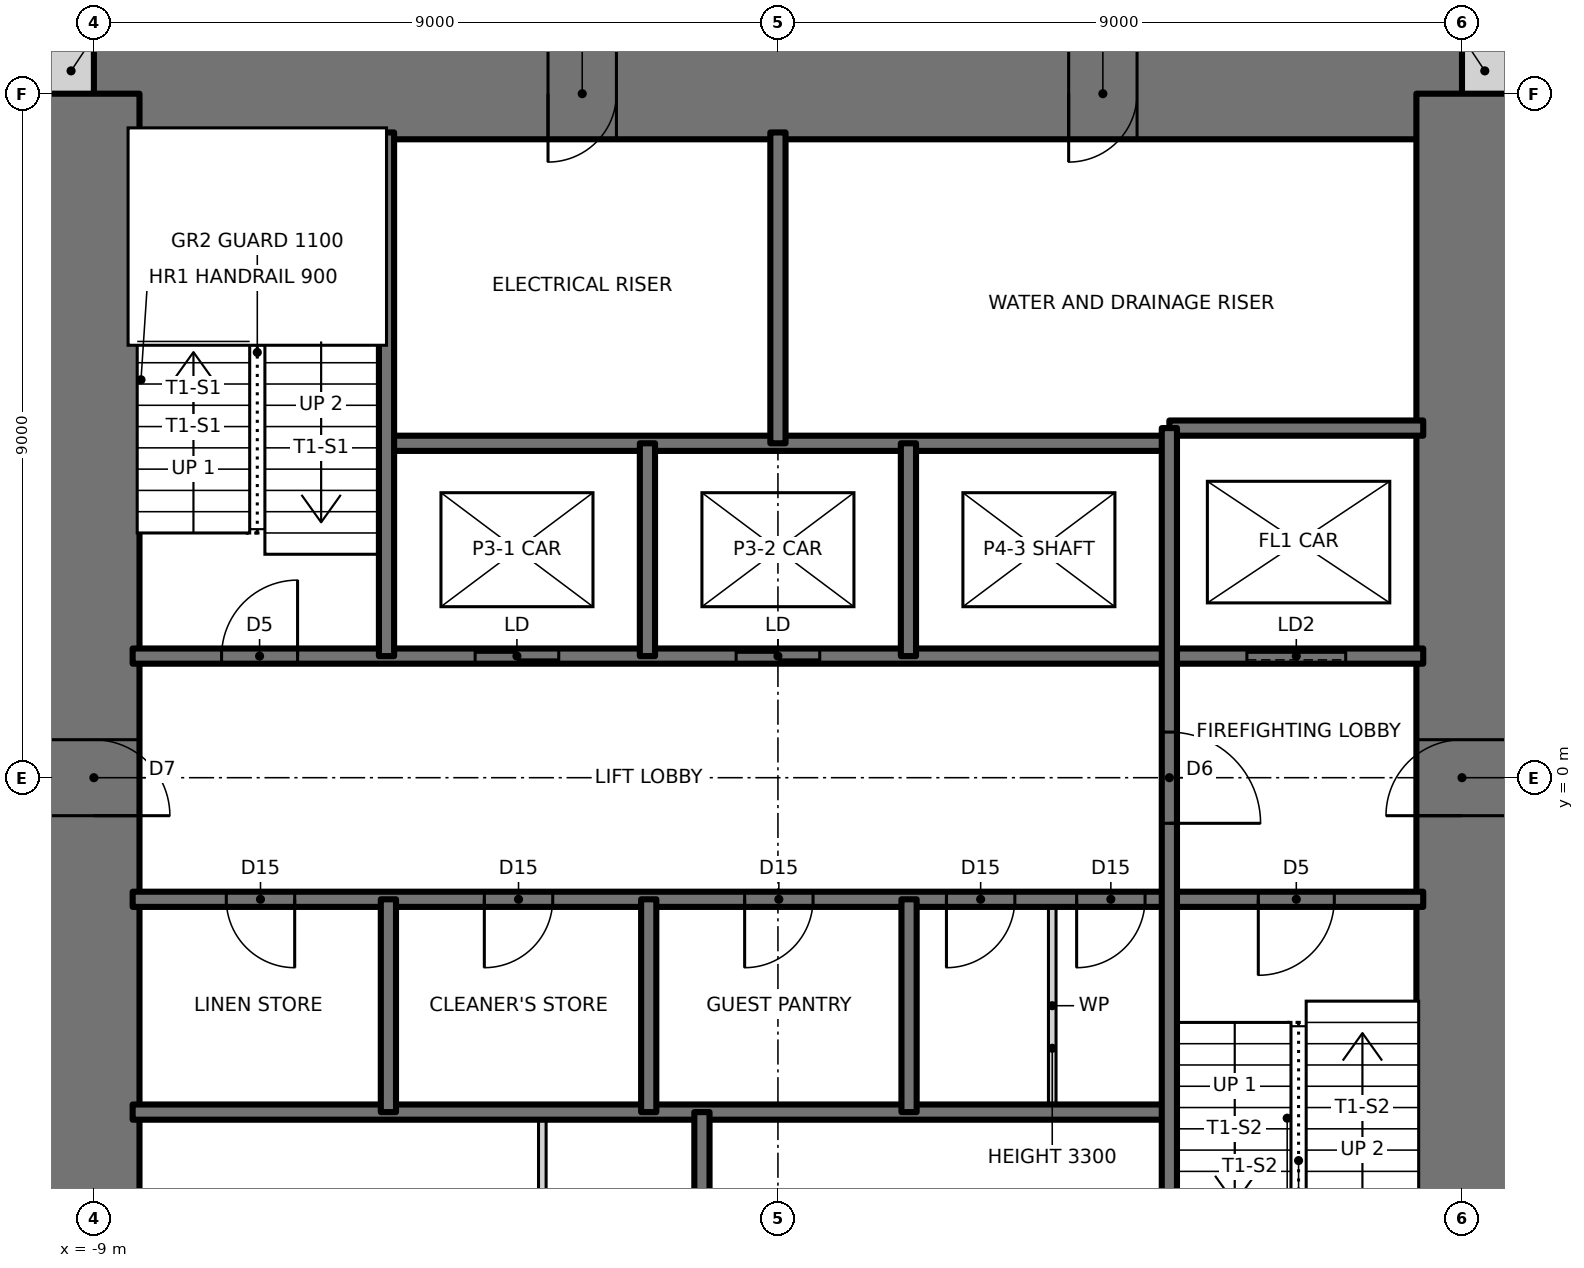
"""IFC4 building model, lengths in metres.
Left out: names, types, materials, properties, quantities, classifications, styles, units other than length and angle.
Written with IfcOpenShell. Run it as: python <this file> out.ifc"""

import sys

from ifc_helpers import new_model, si_unit, direction, frame, frame_2d, origin, place, context, subcontext, project, spatial, rectangle, extrude, element, fill, save


model = new_model("IFC4")
c1 = context("Model", 3, precision=1e-05, world=origin(), true_north=direction((0.0, 1.0)))
c2 = subcontext(c1, "Body", "Model", "MODEL_VIEW")
j1 = project(units=[si_unit("LENGTHUNIT", "METRE"), si_unit("PLANEANGLEUNIT", "RADIAN")], contexts=[c1])
p1 = place(None, origin())
s1 = spatial("IfcSite", under=j1, at=p1, CompositionType="ELEMENT")
p2 = place(p1, origin())
s2 = spatial("IfcBuilding", under=s1, at=p2, CompositionType="ELEMENT")
p3 = place(p2, frame((0.0, 0.0, 184.5)))
s3 = spatial("IfcBuildingStorey", under=s2, at=p3, CompositionType="ELEMENT", Elevation=184.5)
for number, where, z_axis, x_axis in (
    (1, (9.0, 9.3, 0.0), (0.0, 0.0, 1.0), (1.0, 0.0, 0.0)),
    (2, (-9.6, 9.3, 0.0), (0.0, 0.0, 1.0), (1.0, 0.0, 0.0)),
):
    element("IfcWall", number, at=place(p3, frame(where, z_axis=z_axis, x_axis=x_axis)), inside=s3, PredefinedType="SOLIDWALL", context=c2, shape_type="SweptSolid", body=[
        extrude(rectangle(XDim=0.6, YDim=0.6, at=frame_2d((0.3, 0.0))), origin(), (0.0, 0.0, 1.0), 3.5),
    ])
p4 = place(p3, frame((9.0, 9.0, 0.0), z_axis=(0.0, 0.0, 1.0), x_axis=(-1.0, 0.0, 0.0)))
e3 = element("IfcWall", 3, at=p4, inside=s3, PredefinedType="SHEAR", context=c2, shape_type="SweptSolid", body=[
    extrude(rectangle(XDim=18.0, YDim=1.2, at=frame_2d((9.0, 0.0))), origin(), (0.0, 0.0, 1.0), 3.5),
])
p5 = place(p4, frame((11.125, 0.0, 0.0)))
e4 = element("IfcOpeningElement", 4, at=p5, cuts=e3, PredefinedType="OPENING", context=c2, shape_type="SweptSolid", body=[
    extrude(rectangle(XDim=0.9, YDim=2.1, at=frame_2d((0.45, 1.05))), frame((0.0, 0.61, 0.0), z_axis=(0.0, -1.0, 0.0), x_axis=(1.0, 0.0, 0.0)), (0.0, 0.0, 1.0), 1.22),
])
p6 = place(p4, frame((4.275, 0.0, 0.0)))
e5 = element("IfcOpeningElement", 5, at=p6, cuts=e3, PredefinedType="OPENING", context=c2, shape_type="SweptSolid", body=[
    extrude(rectangle(XDim=0.9, YDim=2.1, at=frame_2d((0.45, 1.05))), frame((0.0, 0.61, 0.0), z_axis=(0.0, -1.0, 0.0), x_axis=(1.0, 0.0, 0.0)), (0.0, 0.0, 1.0), 1.22),
])
p7 = place(p3, frame((9.0, -9.0, 0.0), z_axis=(0.0, 0.0, 1.0), x_axis=(0.0, 1.0, 0.0)))
e6 = element("IfcWall", 6, at=p7, inside=s3, PredefinedType="SHEAR", context=c2, shape_type="SweptSolid", body=[
    extrude(rectangle(XDim=18.0, YDim=1.2, at=frame_2d((9.0, 0.0))), origin(), (0.0, 0.0, 1.0), 3.5),
])
p8 = place(p7, frame((8.5, 0.0, 0.0)))
e7 = element("IfcOpeningElement", 7, at=p8, cuts=e6, PredefinedType="OPENING", context=c2, shape_type="SweptSolid", body=[
    extrude(rectangle(XDim=1.0, YDim=2.1, at=frame_2d((0.5, 1.05))), frame((0.0, 0.61, 0.0), z_axis=(0.0, -1.0, 0.0), x_axis=(1.0, 0.0, 0.0)), (0.0, 0.0, 1.0), 1.22),
])
p9 = place(p3, frame((-9.0, 9.0, 0.0), z_axis=(0.0, 0.0, 1.0), x_axis=(0.0, -1.0, 0.0)))
e8 = element("IfcWall", 8, at=p9, inside=s3, PredefinedType="SHEAR", context=c2, shape_type="SweptSolid", body=[
    extrude(rectangle(XDim=18.0, YDim=1.2, at=frame_2d((9.0, 0.0))), origin(), (0.0, 0.0, 1.0), 3.5),
])
p10 = place(p9, frame((8.5, 0.0, 0.0)))
e9 = element("IfcOpeningElement", 9, at=p10, cuts=e8, PredefinedType="OPENING", context=c2, shape_type="SweptSolid", body=[
    extrude(rectangle(XDim=1.0, YDim=2.1, at=frame_2d((0.5, 1.05))), frame((0.0, 0.61, 0.0), z_axis=(0.0, -1.0, 0.0), x_axis=(1.0, 0.0, 0.0)), (0.0, 0.0, 1.0), 1.22),
])
p11 = place(p3, frame((-8.49, -4.4, 0.0), z_axis=(0.0, 0.0, 1.0), x_axis=(1.0, 0.0, 0.0)))
e10 = element("IfcWall", 10, at=p11, inside=s3, PredefinedType="SOLIDWALL", context=c2, shape_type="SweptSolid", body=[
    extrude(rectangle(XDim=13.64, YDim=0.2, at=frame_2d((6.82, 0.0))), origin(), (0.0, 0.0, 1.0), 3.5),
])
p12 = place(p3, frame((-8.49, -1.6, 0.0), z_axis=(0.0, 0.0, 1.0), x_axis=(1.0, 0.0, 0.0)))
e11 = element("IfcWall", 11, at=p12, inside=s3, PredefinedType="SOLIDWALL", context=c2, shape_type="SweptSolid", body=[
    extrude(rectangle(XDim=16.98, YDim=0.2, at=frame_2d((8.49, 0.0))), origin(), (0.0, 0.0, 1.0), 3.5),
])
p13 = place(p12, frame((14.81, 0.0, 0.0)))
e12 = element("IfcOpeningElement", 12, at=p13, cuts=e11, PredefinedType="OPENING", context=c2, shape_type="SweptSolid", body=[
    extrude(rectangle(XDim=1.0, YDim=2.1, at=frame_2d((0.5, 1.05))), frame((0.0, 0.11, 0.0), z_axis=(0.0, -1.0, 0.0), x_axis=(1.0, 0.0, 0.0)), (0.0, 0.0, 1.0), 0.22),
])
p14 = place(p12, frame((1.232, 0.0, 0.0)))
e13 = element("IfcOpeningElement", 13, at=p14, cuts=e11, PredefinedType="OPENING", context=c2, shape_type="SweptSolid", body=[
    extrude(rectangle(XDim=0.9, YDim=2.1, at=frame_2d((0.45, 1.05))), frame((0.0, 0.11, 0.0), z_axis=(0.0, -1.0, 0.0), x_axis=(1.0, 0.0, 0.0)), (0.0, 0.0, 1.0), 0.22),
])
p15 = place(p12, frame((4.627, 0.0, 0.0)))
e14 = element("IfcOpeningElement", 14, at=p15, cuts=e11, PredefinedType="OPENING", context=c2, shape_type="SweptSolid", body=[
    extrude(rectangle(XDim=0.9, YDim=2.1, at=frame_2d((0.45, 1.05))), frame((0.0, 0.11, 0.0), z_axis=(0.0, -1.0, 0.0), x_axis=(1.0, 0.0, 0.0)), (0.0, 0.0, 1.0), 0.22),
])
p16 = place(p12, frame((8.052, 0.0, 0.0)))
e15 = element("IfcOpeningElement", 15, at=p16, cuts=e11, PredefinedType="OPENING", context=c2, shape_type="SweptSolid", body=[
    extrude(rectangle(XDim=0.9, YDim=2.1, at=frame_2d((0.45, 1.05))), frame((0.0, 0.11, 0.0), z_axis=(0.0, -1.0, 0.0), x_axis=(1.0, 0.0, 0.0)), (0.0, 0.0, 1.0), 0.22),
])
p17 = place(p12, frame((12.42, 0.0, 0.0)))
e16 = element("IfcOpeningElement", 16, at=p17, cuts=e11, PredefinedType="OPENING", context=c2, shape_type="SweptSolid", body=[
    extrude(rectangle(XDim=0.9, YDim=2.1, at=frame_2d((0.45, 1.05))), frame((0.0, 0.11, 0.0), z_axis=(0.0, -1.0, 0.0), x_axis=(1.0, 0.0, 0.0)), (0.0, 0.0, 1.0), 0.22),
])
p18 = place(p12, frame((10.707, 0.0, 0.0)))
e17 = element("IfcOpeningElement", 17, at=p18, cuts=e11, PredefinedType="OPENING", context=c2, shape_type="SweptSolid", body=[
    extrude(rectangle(XDim=0.9, YDim=2.1, at=frame_2d((0.45, 1.05))), frame((0.0, 0.11, 0.0), z_axis=(0.0, -1.0, 0.0), x_axis=(1.0, 0.0, 0.0)), (0.0, 0.0, 1.0), 0.22),
])
p19 = place(p3, frame((-8.49, 1.6, 0.0), z_axis=(0.0, 0.0, 1.0), x_axis=(1.0, 0.0, 0.0)))
e18 = element("IfcWall", 18, at=p19, inside=s3, PredefinedType="SOLIDWALL", context=c2, shape_type="SweptSolid", body=[
    extrude(rectangle(XDim=16.98, YDim=0.2, at=frame_2d((8.49, 0.0))), origin(), (0.0, 0.0, 1.0), 3.5),
])
p20 = place(p19, frame((1.17, 0.0, 0.0)))
e19 = element("IfcOpeningElement", 19, at=p20, cuts=e18, PredefinedType="OPENING", context=c2, shape_type="SweptSolid", body=[
    extrude(rectangle(XDim=1.0, YDim=2.1, at=frame_2d((0.5, 1.05))), frame((0.0, 0.11, 0.0), z_axis=(0.0, -1.0, 0.0), x_axis=(1.0, 0.0, 0.0)), (0.0, 0.0, 1.0), 0.22),
])
p21 = place(p19, frame((4.506, 0.0, 0.0)))
e20 = element("IfcOpeningElement", 20, at=p21, cuts=e18, PredefinedType="OPENING", context=c2, shape_type="SweptSolid", body=[
    extrude(rectangle(XDim=1.1, YDim=2.1, at=frame_2d((0.55, 1.05))), frame((0.0, 0.11, 0.0), z_axis=(0.0, -1.0, 0.0), x_axis=(1.0, 0.0, 0.0)), (0.0, 0.0, 1.0), 0.22),
])
p22 = place(p19, frame((7.94, 0.0, 0.0)))
e21 = element("IfcOpeningElement", 21, at=p22, cuts=e18, PredefinedType="OPENING", context=c2, shape_type="SweptSolid", body=[
    extrude(rectangle(XDim=1.1, YDim=2.1, at=frame_2d((0.55, 1.05))), frame((0.0, 0.11, 0.0), z_axis=(0.0, -1.0, 0.0), x_axis=(1.0, 0.0, 0.0)), (0.0, 0.0, 1.0), 0.22),
])
p23 = place(p19, frame((14.66, 0.0, 0.0)))
e22 = element("IfcOpeningElement", 22, at=p23, cuts=e18, PredefinedType="OPENING", context=c2, shape_type="SweptSolid", body=[
    extrude(rectangle(XDim=1.3, YDim=2.1, at=frame_2d((0.65, 1.05))), frame((0.0, 0.11, 0.0), z_axis=(0.0, -1.0, 0.0), x_axis=(1.0, 0.0, 0.0)), (0.0, 0.0, 1.0), 0.22),
])
p24 = place(p3, frame((-5.15, 4.4, 0.0), z_axis=(0.0, 0.0, 1.0), x_axis=(1.0, 0.0, 0.0)))
e23 = element("IfcWall", 23, at=p24, inside=s3, PredefinedType="SOLIDWALL", context=c2, shape_type="SweptSolid", body=[
    extrude(rectangle(XDim=10.3, YDim=0.2, at=frame_2d((5.15, 0.0))), origin(), (0.0, 0.0, 1.0), 3.5),
])
p25 = place(p3, frame((5.15, 4.6, 0.0), z_axis=(0.0, 0.0, 1.0), x_axis=(1.0, 0.0, 0.0)))
e24 = element("IfcWall", 24, at=p25, inside=s3, PredefinedType="SOLIDWALL", context=c2, shape_type="SweptSolid", body=[
    extrude(rectangle(XDim=3.34, YDim=0.2, at=frame_2d((1.67, 0.0))), origin(), (0.0, 0.0, 1.0), 3.5),
])
p26 = place(p3, frame((5.15, -8.49, 0.0), z_axis=(0.0, 0.0, 1.0), x_axis=(0.0, 1.0, 0.0)))
e25 = element("IfcWall", 25, at=p26, inside=s3, PredefinedType="SOLIDWALL", context=c2, shape_type="SweptSolid", body=[
    extrude(rectangle(XDim=13.09, YDim=0.2, at=frame_2d((6.545, 0.0))), origin(), (0.0, 0.0, 1.0), 3.5),
])
p27 = place(p26, frame((7.89, 0.0, 0.0)))
e26 = element("IfcOpeningElement", 26, at=p27, cuts=e25, PredefinedType="OPENING", context=c2, shape_type="SweptSolid", body=[
    extrude(rectangle(XDim=1.2, YDim=2.1, at=frame_2d((0.6, 1.05))), frame((0.0, 0.11, 0.0), z_axis=(0.0, -1.0, 0.0), x_axis=(1.0, 0.0, 0.0)), (0.0, 0.0, 1.0), 0.22),
])
p28 = place(p3, frame((3.609, -4.4, 0.0), z_axis=(0.0, 0.0, 1.0), x_axis=(0.0, 1.0, 0.0)))
e27 = element("IfcWall", 27, at=p28, inside=s3, PredefinedType="PARTITIONING", context=c2, shape_type="SweptSolid", body=[
    extrude(rectangle(XDim=2.8, YDim=0.1, at=frame_2d((1.4, 0.0))), origin(), (0.0, 0.0, 1.0), 3.3),
])
for number, where, z_axis, x_axis in (
    (28, (1.725, -4.4, 0.0), (0.0, 0.0, 1.0), (0.0, 1.0, 0.0)),
    (29, (1.717, 1.6, 0.0), (0.0, 0.0, 1.0), (0.0, 1.0, 0.0)),
):
    element("IfcWall", number, at=place(p3, frame(where, z_axis=z_axis, x_axis=x_axis)), inside=s3, PredefinedType="SOLIDWALL", context=c2, shape_type="SweptSolid", body=[
        extrude(rectangle(XDim=2.8, YDim=0.2, at=frame_2d((1.4, 0.0))), origin(), (0.0, 0.0, 1.0), 3.5),
    ])
for number, where, z_axis, x_axis in (
    (30, (0.0, 4.4, 0.0), (0.0, 0.0, 1.0), (0.0, 1.0, 0.0)),
    (31, (-1.0, -8.49, 0.0), (0.0, 0.0, 1.0), (0.0, 1.0, 0.0)),
):
    element("IfcWall", number, at=place(p3, frame(where, z_axis=z_axis, x_axis=x_axis)), inside=s3, PredefinedType="SOLIDWALL", context=c2, shape_type="SweptSolid", body=[
        extrude(rectangle(XDim=4.09, YDim=0.2, at=frame_2d((2.045, 0.0))), origin(), (0.0, 0.0, 1.0), 3.5),
    ])
for number, where, z_axis, x_axis in (
    (32, (-1.7, -4.4, 0.0), (0.0, 0.0, 1.0), (0.0, 1.0, 0.0)),
    (33, (-1.717, 1.6, 0.0), (0.0, 0.0, 1.0), (0.0, 1.0, 0.0)),
):
    element("IfcWall", number, at=place(p3, frame(where, z_axis=z_axis, x_axis=x_axis)), inside=s3, PredefinedType="SOLIDWALL", context=c2, shape_type="SweptSolid", body=[
        extrude(rectangle(XDim=2.8, YDim=0.2, at=frame_2d((1.4, 0.0))), origin(), (0.0, 0.0, 1.0), 3.5),
    ])
p29 = place(p3, frame((-3.1, -8.49, 0.0), z_axis=(0.0, 0.0, 1.0), x_axis=(0.0, 1.0, 0.0)))
e34 = element("IfcWall", 34, at=p29, inside=s3, PredefinedType="PARTITIONING", context=c2, shape_type="SweptSolid", body=[
    extrude(rectangle(XDim=4.09, YDim=0.1, at=frame_2d((2.045, 0.0))), origin(), (0.0, 0.0, 1.0), 3.3),
])
p30 = place(p29, frame((1.595, 0.0, 0.0)))
e35 = element("IfcOpeningElement", 35, at=p30, cuts=e34, PredefinedType="OPENING", context=c2, shape_type="SweptSolid", body=[
    extrude(rectangle(XDim=0.9, YDim=2.1, at=frame_2d((0.45, 1.05))), frame((0.0, 0.06, 0.0), z_axis=(0.0, -1.0, 0.0), x_axis=(1.0, 0.0, 0.0)), (0.0, 0.0, 1.0), 0.12),
])
p31 = place(p3, frame((-5.125, -4.4, 0.0), z_axis=(0.0, 0.0, 1.0), x_axis=(0.0, 1.0, 0.0)))
e36 = element("IfcWall", 36, at=p31, inside=s3, PredefinedType="SOLIDWALL", context=c2, shape_type="SweptSolid", body=[
    extrude(rectangle(XDim=2.8, YDim=0.2, at=frame_2d((1.4, 0.0))), origin(), (0.0, 0.0, 1.0), 3.5),
])
p32 = place(p3, frame((-5.15, 1.6, 0.0), z_axis=(0.0, 0.0, 1.0), x_axis=(0.0, 1.0, 0.0)))
e37 = element("IfcWall", 37, at=p32, inside=s3, PredefinedType="SOLIDWALL", context=c2, shape_type="SweptSolid", body=[
    extrude(rectangle(XDim=6.89, YDim=0.2, at=frame_2d((3.445, 0.0))), origin(), (0.0, 0.0, 1.0), 3.5),
])
p33 = place(p20, origin())
e38 = element("IfcDoor", 38, at=p33, inside=s3, OperationType="SINGLE_SWING_RIGHT", PredefinedType="DOOR", context=c2, shape_type="SweptSolid", body=[
    extrude(rectangle(XDim=1.0, YDim=2.1, at=frame_2d((0.5, 1.05))), frame((0.0, 0.025, 0.0), z_axis=(0.0, -1.0, 0.0), x_axis=(1.0, 0.0, 0.0)), (0.0, 0.0, 1.0), 0.05),
])
fill(e19, e38)
p34 = place(p13, frame((1.0, 0.0, 0.0), z_axis=(0.0, 0.0, 1.0), x_axis=(-1.0, 0.0, 0.0)))
e39 = element("IfcDoor", 39, at=p34, inside=s3, OperationType="SINGLE_SWING_RIGHT", PredefinedType="DOOR", context=c2, shape_type="SweptSolid", body=[
    extrude(rectangle(XDim=1.0, YDim=2.1, at=frame_2d((0.5, 1.05))), frame((0.0, 0.025, 0.0), z_axis=(0.0, -1.0, 0.0), x_axis=(1.0, 0.0, 0.0)), (0.0, 0.0, 1.0), 0.05),
])
fill(e12, e39)
p35 = place(p27, frame((1.2, 0.0, 0.0), z_axis=(0.0, 0.0, 1.0), x_axis=(-1.0, 0.0, 0.0)))
e40 = element("IfcDoor", 40, at=p35, inside=s3, OperationType="SINGLE_SWING_RIGHT", PredefinedType="DOOR", context=c2, shape_type="SweptSolid", body=[
    extrude(rectangle(XDim=1.2, YDim=2.1, at=frame_2d((0.6, 1.05))), frame((0.0, 0.025, 0.0), z_axis=(0.0, -1.0, 0.0), x_axis=(1.0, 0.0, 0.0)), (0.0, 0.0, 1.0), 0.05),
])
fill(e26, e40)
p36 = place(p14, frame((0.9, 0.0, 0.0), z_axis=(0.0, 0.0, 1.0), x_axis=(-1.0, 0.0, 0.0)))
e41 = element("IfcDoor", 41, at=p36, inside=s3, OperationType="SINGLE_SWING_LEFT", PredefinedType="DOOR", context=c2, shape_type="SweptSolid", body=[
    extrude(rectangle(XDim=0.9, YDim=2.1, at=frame_2d((0.45, 1.05))), frame((0.0, 0.025, 0.0), z_axis=(0.0, -1.0, 0.0), x_axis=(1.0, 0.0, 0.0)), (0.0, 0.0, 1.0), 0.05),
])
fill(e13, e41)
p37 = place(p15, frame((0.9, 0.0, 0.0), z_axis=(0.0, 0.0, 1.0), x_axis=(-1.0, 0.0, 0.0)))
e42 = element("IfcDoor", 42, at=p37, inside=s3, OperationType="SINGLE_SWING_RIGHT", PredefinedType="DOOR", context=c2, shape_type="SweptSolid", body=[
    extrude(rectangle(XDim=0.9, YDim=2.1, at=frame_2d((0.45, 1.05))), frame((0.0, 0.025, 0.0), z_axis=(0.0, -1.0, 0.0), x_axis=(1.0, 0.0, 0.0)), (0.0, 0.0, 1.0), 0.05),
])
fill(e14, e42)
p38 = place(p16, frame((0.9, 0.0, 0.0), z_axis=(0.0, 0.0, 1.0), x_axis=(-1.0, 0.0, 0.0)))
e43 = element("IfcDoor", 43, at=p38, inside=s3, OperationType="SINGLE_SWING_RIGHT", PredefinedType="DOOR", context=c2, shape_type="SweptSolid", body=[
    extrude(rectangle(XDim=0.9, YDim=2.1, at=frame_2d((0.45, 1.05))), frame((0.0, 0.025, 0.0), z_axis=(0.0, -1.0, 0.0), x_axis=(1.0, 0.0, 0.0)), (0.0, 0.0, 1.0), 0.05),
])
fill(e15, e43)
p39 = place(p17, frame((0.9, 0.0, 0.0), z_axis=(0.0, 0.0, 1.0), x_axis=(-1.0, 0.0, 0.0)))
e44 = element("IfcDoor", 44, at=p39, inside=s3, OperationType="SINGLE_SWING_RIGHT", PredefinedType="DOOR", context=c2, shape_type="SweptSolid", body=[
    extrude(rectangle(XDim=0.9, YDim=2.1, at=frame_2d((0.45, 1.05))), frame((0.0, 0.025, 0.0), z_axis=(0.0, -1.0, 0.0), x_axis=(1.0, 0.0, 0.0)), (0.0, 0.0, 1.0), 0.05),
])
fill(e16, e44)
p40 = place(p18, frame((0.9, 0.0, 0.0), z_axis=(0.0, 0.0, 1.0), x_axis=(-1.0, 0.0, 0.0)))
e45 = element("IfcDoor", 45, at=p40, inside=s3, OperationType="SINGLE_SWING_RIGHT", PredefinedType="DOOR", context=c2, shape_type="SweptSolid", body=[
    extrude(rectangle(XDim=0.9, YDim=2.1, at=frame_2d((0.45, 1.05))), frame((0.0, 0.025, 0.0), z_axis=(0.0, -1.0, 0.0), x_axis=(1.0, 0.0, 0.0)), (0.0, 0.0, 1.0), 0.05),
])
fill(e17, e45)
p41 = place(p10, origin())
e46 = element("IfcDoor", 46, at=p41, inside=s3, OperationType="SINGLE_SWING_RIGHT", PredefinedType="DOOR", context=c2, shape_type="SweptSolid", body=[
    extrude(rectangle(XDim=1.0, YDim=2.1, at=frame_2d((0.5, 1.05))), frame((0.0, 0.025, 0.0), z_axis=(0.0, -1.0, 0.0), x_axis=(1.0, 0.0, 0.0)), (0.0, 0.0, 1.0), 0.05),
])
fill(e9, e46)
p42 = place(p8, origin())
e47 = element("IfcDoor", 47, at=p42, inside=s3, OperationType="SINGLE_SWING_LEFT", PredefinedType="DOOR", context=c2, shape_type="SweptSolid", body=[
    extrude(rectangle(XDim=1.0, YDim=2.1, at=frame_2d((0.5, 1.05))), frame((0.0, 0.025, 0.0), z_axis=(0.0, -1.0, 0.0), x_axis=(1.0, 0.0, 0.0)), (0.0, 0.0, 1.0), 0.05),
])
fill(e7, e47)
p43 = place(p5, origin())
e48 = element("IfcDoor", 48, at=p43, inside=s3, OperationType="SINGLE_SWING_RIGHT", PredefinedType="DOOR", context=c2, shape_type="SweptSolid", body=[
    extrude(rectangle(XDim=0.9, YDim=2.1, at=frame_2d((0.45, 1.05))), frame((0.0, 0.025, 0.0), z_axis=(0.0, -1.0, 0.0), x_axis=(1.0, 0.0, 0.0)), (0.0, 0.0, 1.0), 0.05),
])
fill(e4, e48)
p44 = place(p6, origin())
e49 = element("IfcDoor", 49, at=p44, inside=s3, OperationType="SINGLE_SWING_RIGHT", PredefinedType="DOOR", context=c2, shape_type="SweptSolid", body=[
    extrude(rectangle(XDim=0.9, YDim=2.1, at=frame_2d((0.45, 1.05))), frame((0.0, 0.025, 0.0), z_axis=(0.0, -1.0, 0.0), x_axis=(1.0, 0.0, 0.0)), (0.0, 0.0, 1.0), 0.05),
])
fill(e5, e49)
p45 = place(p21, origin())
e50 = element("IfcDoor", 50, at=p45, inside=s3, OperationType="DOUBLE_DOOR_SLIDING", PredefinedType="DOOR", context=c2, shape_type="SweptSolid", body=[
    extrude(rectangle(XDim=1.1, YDim=2.1, at=frame_2d((0.55, 1.05))), frame((0.0, 0.025, 0.0), z_axis=(0.0, -1.0, 0.0), x_axis=(1.0, 0.0, 0.0)), (0.0, 0.0, 1.0), 0.05),
])
fill(e20, e50)
p46 = place(p22, origin())
e51 = element("IfcDoor", 51, at=p46, inside=s3, OperationType="DOUBLE_DOOR_SLIDING", PredefinedType="DOOR", context=c2, shape_type="SweptSolid", body=[
    extrude(rectangle(XDim=1.1, YDim=2.1, at=frame_2d((0.55, 1.05))), frame((0.0, 0.025, 0.0), z_axis=(0.0, -1.0, 0.0), x_axis=(1.0, 0.0, 0.0)), (0.0, 0.0, 1.0), 0.05),
])
fill(e21, e51)
p47 = place(p23, origin())
e52 = element("IfcDoor", 52, at=p47, inside=s3, OperationType="SLIDING_TO_LEFT", PredefinedType="DOOR", context=c2, shape_type="SweptSolid", body=[
    extrude(rectangle(XDim=1.3, YDim=2.1, at=frame_2d((0.65, 1.05))), frame((0.0, 0.025, 0.0), z_axis=(0.0, -1.0, 0.0), x_axis=(1.0, 0.0, 0.0)), (0.0, 0.0, 1.0), 0.05),
])
fill(e22, e52)
save(model, sys.argv[1])
